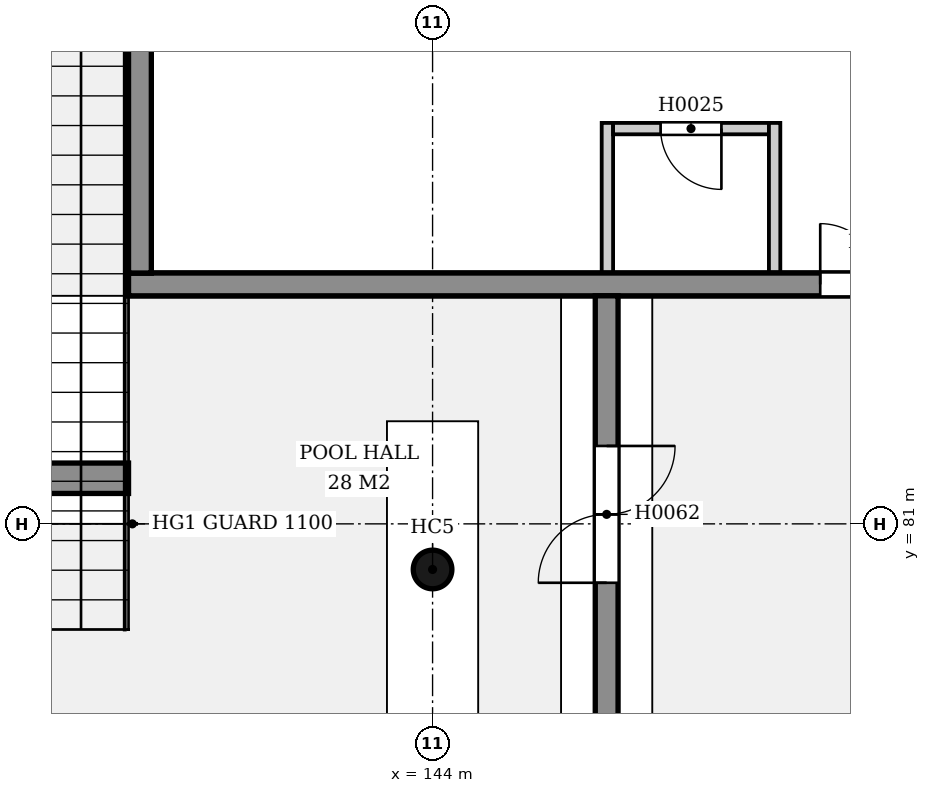
"""IFC4 building model, lengths in metres.
Left out: names, types, materials, properties, quantities, classifications, styles, units other than length and angle.
Written with IfcOpenShell. Run it as: python <this file> out.ifc"""

import sys

from ifc_helpers import new_model, si_unit, direction, frame, frame_2d, origin, origin_2d, place, context, subcontext, project, spatial, rectangle, hollow_circle, extrude, element, fill, save


model = new_model("IFC4")
c1 = context("Model", 3, precision=1e-05, world=origin(), true_north=direction((0.0, 1.0)))
c2 = subcontext(c1, "Body", "Model", "MODEL_VIEW")
j1 = project(units=[si_unit("LENGTHUNIT", "METRE"), si_unit("PLANEANGLEUNIT", "RADIAN")], contexts=[c1])
p1 = place(None, origin())
s1 = spatial("IfcSite", under=j1, at=p1, CompositionType="ELEMENT")
p2 = place(p1, origin())
s2 = spatial("IfcBuilding", under=s1, at=p2, CompositionType="ELEMENT")
p3 = place(p2, origin())
s3 = spatial("IfcBuildingStorey", under=s2, at=p3, CompositionType="ELEMENT", Elevation=0.0)
p4 = place(p3, frame((146.29, 38.0, 0.0), z_axis=(0.0, 0.0, 1.0), x_axis=(0.0, 1.0, 0.0)))
e1 = element("IfcWall", 1, at=p4, inside=s3, PredefinedType="SOLIDWALL", context=c2, shape_type="SweptSolid", body=[
    extrude(rectangle(XDim=46.0, YDim=0.3, at=frame_2d((23.0, 0.0))), origin(), (0.0, 0.0, 1.0), 5.0),
])
p5 = place(p4, frame((1.975, 0.0, 0.0)))
e2 = element("IfcOpeningElement", 2, at=p5, cuts=e1, PredefinedType="OPENING", context=c2, shape_type="SweptSolid", body=[
    extrude(rectangle(XDim=1.8, YDim=2.1, at=frame_2d((0.9, 1.05))), frame((0.0, 0.16, 0.0), z_axis=(0.0, -1.0, 0.0), x_axis=(1.0, 0.0, 0.0)), (0.0, 0.0, 1.0), 0.32),
])
p6 = place(p4, frame((7.725, 0.0, 0.0)))
e3 = element("IfcOpeningElement", 3, at=p6, cuts=e1, PredefinedType="OPENING", context=c2, shape_type="SweptSolid", body=[
    extrude(rectangle(XDim=1.8, YDim=2.1, at=frame_2d((0.9, 1.05))), frame((0.0, 0.16, 0.0), z_axis=(0.0, -1.0, 0.0), x_axis=(1.0, 0.0, 0.0)), (0.0, 0.0, 1.0), 0.32),
])
p7 = place(p4, frame((13.475, 0.0, 0.0)))
e4 = element("IfcOpeningElement", 4, at=p7, cuts=e1, PredefinedType="OPENING", context=c2, shape_type="SweptSolid", body=[
    extrude(rectangle(XDim=1.8, YDim=2.1, at=frame_2d((0.9, 1.05))), frame((0.0, 0.16, 0.0), z_axis=(0.0, -1.0, 0.0), x_axis=(1.0, 0.0, 0.0)), (0.0, 0.0, 1.0), 0.32),
])
p8 = place(p4, frame((19.225, 0.0, 0.0)))
e5 = element("IfcOpeningElement", 5, at=p8, cuts=e1, PredefinedType="OPENING", context=c2, shape_type="SweptSolid", body=[
    extrude(rectangle(XDim=1.8, YDim=2.1, at=frame_2d((0.9, 1.05))), frame((0.0, 0.16, 0.0), z_axis=(0.0, -1.0, 0.0), x_axis=(1.0, 0.0, 0.0)), (0.0, 0.0, 1.0), 0.32),
])
p9 = place(p4, frame((24.975, 0.0, 0.0)))
e6 = element("IfcOpeningElement", 6, at=p9, cuts=e1, PredefinedType="OPENING", context=c2, shape_type="SweptSolid", body=[
    extrude(rectangle(XDim=1.8, YDim=2.1, at=frame_2d((0.9, 1.05))), frame((0.0, 0.16, 0.0), z_axis=(0.0, -1.0, 0.0), x_axis=(1.0, 0.0, 0.0)), (0.0, 0.0, 1.0), 0.32),
])
p10 = place(p4, frame((30.725, 0.0, 0.0)))
e7 = element("IfcOpeningElement", 7, at=p10, cuts=e1, PredefinedType="OPENING", context=c2, shape_type="SweptSolid", body=[
    extrude(rectangle(XDim=1.8, YDim=2.1, at=frame_2d((0.9, 1.05))), frame((0.0, 0.16, 0.0), z_axis=(0.0, -1.0, 0.0), x_axis=(1.0, 0.0, 0.0)), (0.0, 0.0, 1.0), 0.32),
])
p11 = place(p4, frame((36.475, 0.0, 0.0)))
e8 = element("IfcOpeningElement", 8, at=p11, cuts=e1, PredefinedType="OPENING", context=c2, shape_type="SweptSolid", body=[
    extrude(rectangle(XDim=1.8, YDim=2.1, at=frame_2d((0.9, 1.05))), frame((0.0, 0.16, 0.0), z_axis=(0.0, -1.0, 0.0), x_axis=(1.0, 0.0, 0.0)), (0.0, 0.0, 1.0), 0.32),
])
p12 = place(p4, frame((42.225, 0.0, 0.0)))
e9 = element("IfcOpeningElement", 9, at=p12, cuts=e1, PredefinedType="OPENING", context=c2, shape_type="SweptSolid", body=[
    extrude(rectangle(XDim=1.8, YDim=2.1, at=frame_2d((0.9, 1.05))), frame((0.0, 0.16, 0.0), z_axis=(0.0, -1.0, 0.0), x_axis=(1.0, 0.0, 0.0)), (0.0, 0.0, 1.0), 0.32),
])
p13 = place(p3, frame((64.0, 81.6, -0.8), z_axis=(0.0, 0.0, 1.0), x_axis=(1.0, 0.0, 0.0)))
e10 = element("IfcWall", 10, at=p13, inside=s3, PredefinedType="SOLIDWALL", context=c2, shape_type="SweptSolid", body=[
    extrude(rectangle(XDim=76.0, YDim=0.4, at=frame_2d((38.0, 0.0))), origin(), (0.0, 0.0, 1.0), 1.66),
])
p14 = place(p3, frame((140.15, 95.55, -1.6), z_axis=(0.0, 0.0, 1.0), x_axis=(0.0, -1.0, 0.0)))
e11 = element("IfcWall", 11, at=p14, inside=s3, PredefinedType="SOLIDWALL", context=c2, shape_type="SweptSolid", body=[
    extrude(rectangle(XDim=11.25, YDim=0.3, at=frame_2d((5.625, 0.0))), origin(), (0.0, 0.0, 1.0), 1.35),
])
p15 = place(p3, frame((140.15, 95.55, 0.0), z_axis=(0.0, 0.0, 1.0), x_axis=(0.0, -1.0, 0.0)))
e12 = element("IfcWall", 12, at=p15, inside=s3, PredefinedType="SOLIDWALL", context=c2, shape_type="SweptSolid", body=[
    extrude(rectangle(XDim=11.25, YDim=0.3, at=frame_2d((5.625, 0.0))), origin(), (0.0, 0.0, 1.0), 5.0),
])
p16 = place(p15, frame((3.37, 0.0, 0.0)))
e13 = element("IfcOpeningElement", 13, at=p16, cuts=e12, PredefinedType="OPENING", context=c2, shape_type="SweptSolid", body=[
    extrude(rectangle(XDim=1.6, YDim=2.1, at=frame_2d((0.8, 1.05))), frame((0.0, 0.16, 0.0), z_axis=(0.0, -1.0, 0.0), x_axis=(1.0, 0.0, 0.0)), (0.0, 0.0, 1.0), 0.32),
])
p17 = place(p3, frame((151.55, 84.15, -1.6), z_axis=(0.0, 0.0, 1.0), x_axis=(-1.0, 0.0, 0.0)))
e14 = element("IfcWall", 14, at=p17, inside=s3, PredefinedType="SOLIDWALL", context=c2, shape_type="SweptSolid", body=[
    extrude(rectangle(XDim=11.55, YDim=0.3, at=frame_2d((5.775, 0.0))), origin(), (0.0, 0.0, 1.0), 1.35),
])
p18 = place(p3, frame((151.55, 84.15, 0.0), z_axis=(0.0, 0.0, 1.0), x_axis=(-1.0, 0.0, 0.0)))
e15 = element("IfcWall", 15, at=p18, inside=s3, PredefinedType="SOLIDWALL", context=c2, shape_type="SweptSolid", body=[
    extrude(rectangle(XDim=11.55, YDim=0.3, at=frame_2d((5.775, 0.0))), origin(), (0.0, 0.0, 1.0), 5.0),
])
p19 = place(p18, frame((0.85, 0.0, 0.0)))
e16 = element("IfcOpeningElement", 16, at=p19, cuts=e15, PredefinedType="OPENING", context=c2, shape_type="SweptSolid", body=[
    extrude(rectangle(XDim=1.6, YDim=2.1, at=frame_2d((0.8, 1.05))), frame((0.0, 0.16, 0.0), z_axis=(0.0, -1.0, 0.0), x_axis=(1.0, 0.0, 0.0)), (0.0, 0.0, 1.0), 0.32),
])
p20 = place(p3, frame((144.0, 80.4, 0.0), z_axis=(0.0, 0.0, 1.0), x_axis=(1.0, 0.0, 0.0)))
e17 = element("IfcColumn", 17, at=p20, inside=s3, PredefinedType="COLUMN", context=c2, shape_type="SweptSolid", body=[
    extrude(hollow_circle(Radius=0.254, WallThickness=0.016, at=origin_2d()), origin(), (0.0, 0.0, 1.0), 5.0),
])
p21 = place(p3, frame((148.425, 86.2, 0.0), z_axis=(0.0, 0.0, 1.0), x_axis=(-1.0, 0.0, 0.0)))
e18 = element("IfcWall", 18, at=p21, inside=s3, PredefinedType="PARTITIONING", context=c2, shape_type="SweptSolid", body=[
    extrude(rectangle(XDim=2.05, YDim=0.15, at=frame_2d((1.025, 0.0))), origin(), (0.0, 0.0, 1.0), 4.75),
])
p22 = place(p21, frame((0.625, 0.0, 0.0)))
e19 = element("IfcOpeningElement", 19, at=p22, cuts=e18, PredefinedType="OPENING", context=c2, shape_type="SweptSolid", body=[
    extrude(rectangle(XDim=0.8, YDim=2.1, at=frame_2d((0.4, 1.05))), frame((0.0, 0.085, 0.0), z_axis=(0.0, -1.0, 0.0), x_axis=(1.0, 0.0, 0.0)), (0.0, 0.0, 1.0), 0.17),
])
for number, where, z_axis, x_axis in (
    (20, (148.5, 86.275, 0.0), (0.0, 0.0, 1.0), (0.0, -1.0, 0.0)),
    (21, (146.3, 86.275, 0.0), (0.0, 0.0, 1.0), (0.0, -1.0, 0.0)),
):
    element("IfcWall", number, at=place(p3, frame(where, z_axis=z_axis, x_axis=x_axis)), inside=s3, PredefinedType="PARTITIONING", context=c2, shape_type="SweptSolid", body=[
        extrude(rectangle(XDim=1.975, YDim=0.15, at=frame_2d((0.987, 0.0))), origin(), (0.0, 0.0, 1.0), 4.75),
    ])
p23 = place(p22, origin())
e22 = element("IfcDoor", 22, at=p23, inside=s3, OperationType="SINGLE_SWING_LEFT", PredefinedType="DOOR", context=c2, shape_type="SweptSolid", body=[
    extrude(rectangle(XDim=0.8, YDim=2.1, at=frame_2d((0.4, 1.05))), frame((0.0, 0.025, 0.0), z_axis=(0.0, -1.0, 0.0), x_axis=(1.0, 0.0, 0.0)), (0.0, 0.0, 1.0), 0.05),
])
fill(e19, e22)
p24 = place(p19, origin())
e23 = element("IfcDoor", 23, at=p24, inside=s3, OperationType="DOUBLE_DOOR_SINGLE_SWING", PredefinedType="DOOR", context=c2, shape_type="SweptSolid", body=[
    extrude(rectangle(XDim=1.6, YDim=2.1, at=frame_2d((0.8, 1.05))), frame((0.0, 0.025, 0.0), z_axis=(0.0, -1.0, 0.0), x_axis=(1.0, 0.0, 0.0)), (0.0, 0.0, 1.0), 0.05),
])
fill(e16, e23)
p25 = place(p12, origin())
e24 = element("IfcDoor", 24, at=p25, inside=s3, OperationType="DOUBLE_DOOR_SINGLE_SWING", PredefinedType="DOOR", context=c2, shape_type="SweptSolid", body=[
    extrude(rectangle(XDim=1.8, YDim=2.1, at=frame_2d((0.9, 1.05))), frame((0.0, 0.025, 0.0), z_axis=(0.0, -1.0, 0.0), x_axis=(1.0, 0.0, 0.0)), (0.0, 0.0, 1.0), 0.05),
])
fill(e9, e24)
save(model, sys.argv[1])
